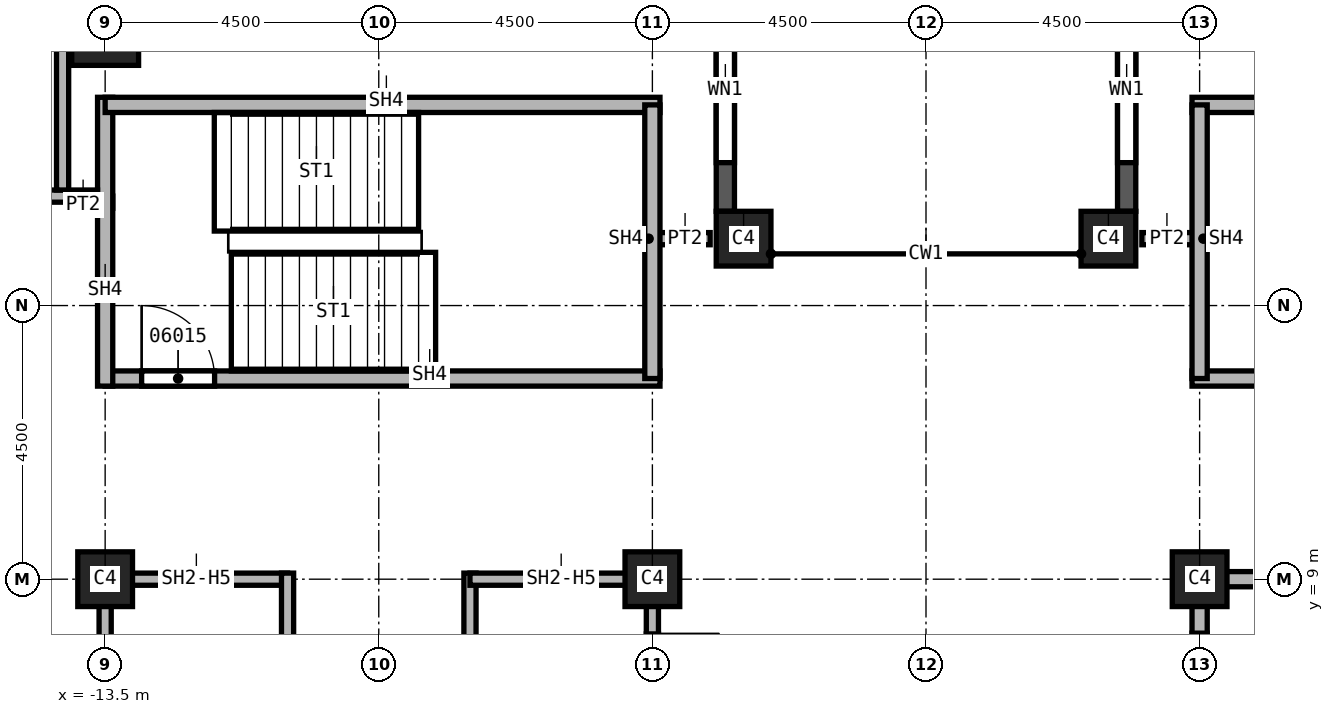
"""IFC4 building model, lengths in metres.
Left out: names, types, materials, properties, quantities, classifications, styles, units other than length and angle.
Written with IfcOpenShell. Run it as: python <this file> out.ifc"""

import sys

from ifc_helpers import new_model, si_unit, direction, frame, frame_2d, origin, origin_2d, place, context, subcontext, project, spatial, rectangle, extrude, element, fill, save


model = new_model("IFC4")
c1 = context("Model", 3, precision=1e-05, world=origin(), true_north=direction((0.0, 1.0)))
c2 = subcontext(c1, "Body", "Model", "MODEL_VIEW")
j1 = project(units=[si_unit("LENGTHUNIT", "METRE"), si_unit("PLANEANGLEUNIT", "RADIAN")], contexts=[c1])
p1 = place(None, origin())
s1 = spatial("IfcSite", under=j1, at=p1, CompositionType="ELEMENT")
p2 = place(p1, origin())
s2 = spatial("IfcBuilding", under=s1, at=p2, CompositionType="ELEMENT")
p3 = place(p2, frame((0.0, 0.0, 130.0)))
s3 = spatial("IfcBuildingStorey", under=s2, at=p3, CompositionType="ELEMENT", Elevation=130.0)
p4 = place(p3, frame((-13.5, 18.0, 0.0), z_axis=(0.0, 0.0, 1.0), x_axis=(1.0, 0.0, 0.0)))
e1 = element("IfcColumn", 1, at=p4, inside=s3, PredefinedType="COLUMN", context=c2, shape_type="SweptSolid", body=[
    extrude(rectangle(XDim=1.1, YDim=1.1, at=origin_2d()), origin(), (0.0, 0.0, 1.0), 3.7),
])
for number, where, z_axis, x_axis in (
    (2, (4.5, 9.0, 0.0), (0.0, 0.0, 1.0), (1.0, 0.0, 0.0)),
    (3, (-4.5, 9.0, 0.0), (0.0, 0.0, 1.0), (1.0, 0.0, 0.0)),
    (4, (-13.5, 9.0, 0.0), (0.0, 0.0, 1.0), (1.0, 0.0, 0.0)),
    (5, (3.0, 14.6, 0.0), (0.0, 0.0, 1.0), (1.0, 0.0, 0.0)),
    (6, (-3.0, 14.6, 0.0), (0.0, 0.0, 1.0), (1.0, 0.0, 0.0)),
):
    element("IfcColumn", number, at=place(p3, frame(where, z_axis=z_axis, x_axis=x_axis)), inside=s3, PredefinedType="COLUMN", context=c2, shape_type="SweptSolid", body=[
        extrude(rectangle(XDim=0.9, YDim=0.9, at=origin_2d()), origin(), (0.0, 0.0, 1.0), 3.7),
    ])
p5 = place(p3, frame((3.3, 23.05, 0.0), z_axis=(0.0, 0.0, 1.0), x_axis=(0.0, -1.0, 0.0)))
e7 = element("IfcWall", 7, at=p5, inside=s3, PredefinedType="SOLIDWALL", context=c2, shape_type="SweptSolid", body=[
    extrude(rectangle(XDim=8.0, YDim=0.3, at=frame_2d((4.0, 0.0))), origin(), (0.0, 0.0, 1.0), 3.1),
])
p6 = place(p5, frame((0.8, 0.0, 0.8)))
e8 = element("IfcOpeningElement", 8, at=p6, cuts=e7, PredefinedType="OPENING", context=c2, shape_type="SweptSolid", body=[
    extrude(rectangle(XDim=2.4, YDim=1.95, at=frame_2d((1.2, 0.975))), frame((0.0, 0.15, 0.0), z_axis=(0.0, -1.0, 0.0), x_axis=(1.0, 0.0, 0.0)), (0.0, 0.0, 1.0), 0.3),
])
p7 = place(p5, frame((4.8, 0.0, 0.8)))
e9 = element("IfcOpeningElement", 9, at=p7, cuts=e7, PredefinedType="OPENING", context=c2, shape_type="SweptSolid", body=[
    extrude(rectangle(XDim=2.4, YDim=1.95, at=frame_2d((1.2, 0.975))), frame((0.0, 0.15, 0.0), z_axis=(0.0, -1.0, 0.0), x_axis=(1.0, 0.0, 0.0)), (0.0, 0.0, 1.0), 0.3),
])
p8 = place(p3, frame((-3.3, 15.05, 0.0), z_axis=(0.0, 0.0, 1.0), x_axis=(0.0, 1.0, 0.0)))
e10 = element("IfcWall", 10, at=p8, inside=s3, PredefinedType="SOLIDWALL", context=c2, shape_type="SweptSolid", body=[
    extrude(rectangle(XDim=8.0, YDim=0.3, at=frame_2d((4.0, 0.0))), origin(), (0.0, 0.0, 1.0), 3.1),
])
p9 = place(p8, frame((0.8, 0.0, 0.8)))
e11 = element("IfcOpeningElement", 11, at=p9, cuts=e10, PredefinedType="OPENING", context=c2, shape_type="SweptSolid", body=[
    extrude(rectangle(XDim=2.4, YDim=1.95, at=frame_2d((1.2, 0.975))), frame((0.0, 0.15, 0.0), z_axis=(0.0, -1.0, 0.0), x_axis=(1.0, 0.0, 0.0)), (0.0, 0.0, 1.0), 0.3),
])
p10 = place(p8, frame((4.8, 0.0, 0.8)))
e12 = element("IfcOpeningElement", 12, at=p10, cuts=e10, PredefinedType="OPENING", context=c2, shape_type="SweptSolid", body=[
    extrude(rectangle(XDim=2.4, YDim=1.95, at=frame_2d((1.2, 0.975))), frame((0.0, 0.15, 0.0), z_axis=(0.0, -1.0, 0.0), x_axis=(1.0, 0.0, 0.0)), (0.0, 0.0, 1.0), 0.3),
])
p11 = place(p3, frame((-14.1, 15.2, 0.0), z_axis=(0.0, 0.0, 1.0), x_axis=(1.0, 0.0, 0.0)))
e13 = element("IfcWall", 13, at=p11, inside=s3, PredefinedType="PARTITIONING", context=c2, shape_type="SweptSolid", body=[
    extrude(rectangle(XDim=0.725, YDim=0.2, at=frame_2d((0.363, 0.0))), origin(), (0.0, 0.0, 1.0), 3.7),
])
for number, where, z_axis, x_axis in (
    (14, (-4.5, 14.6, 0.0), (0.0, 0.0, 1.0), (1.0, 0.0, 0.0)),
    (15, (3.55, 14.6, 0.0), (0.0, 0.0, 1.0), (1.0, 0.0, 0.0)),
):
    element("IfcWall", number, at=place(p3, frame(where, z_axis=z_axis, x_axis=x_axis)), inside=s3, PredefinedType="PARTITIONING", context=c2, shape_type="SweptSolid", body=[
        extrude(rectangle(XDim=0.95, YDim=0.2, at=frame_2d((0.475, 0.0))), origin(), (0.0, 0.0, 1.0), 3.7),
    ])
p12 = place(p3, frame((-13.5, 5.0, 0.0), z_axis=(0.0, 0.0, 1.0), x_axis=(0.0, 1.0, 0.0)))
e16 = element("IfcWall", 16, at=p12, inside=s3, PredefinedType="SOLIDWALL", context=c2, shape_type="SweptSolid", body=[
    extrude(rectangle(XDim=4.1, YDim=0.2, at=frame_2d((2.05, 0.0))), origin(), (0.0, 0.0, 1.0), 2.938),
])
p13 = place(p3, frame((-13.5, 9.0, 0.0), z_axis=(0.0, 0.0, 1.0), x_axis=(1.0, 0.0, 0.0)))
e17 = element("IfcWall", 17, at=p13, inside=s3, PredefinedType="SOLIDWALL", context=c2, shape_type="SweptSolid", body=[
    extrude(rectangle(XDim=3.0, YDim=0.2, at=frame_2d((1.5, 0.0))), origin(), (0.0, 0.0, 1.0), 2.938),
])
p14 = place(p3, frame((-10.5, 4.925, 0.0), z_axis=(0.0, 0.0, 1.0), x_axis=(0.0, 1.0, 0.0)))
e18 = element("IfcWall", 18, at=p14, inside=s3, PredefinedType="SOLIDWALL", context=c2, shape_type="SweptSolid", body=[
    extrude(rectangle(XDim=4.175, YDim=0.2, at=frame_2d((2.087, 0.0))), origin(), (0.0, 0.0, 1.0), 3.7),
])
p15 = place(p14, frame((0.25, 0.0, 0.0)))
e19 = element("IfcOpeningElement", 19, at=p15, cuts=e18, PredefinedType="OPENING", context=c2, shape_type="SweptSolid", body=[
    extrude(rectangle(XDim=1.1, YDim=2.1, at=frame_2d((0.55, 1.05))), frame((0.0, 0.1, 0.0), z_axis=(0.0, -1.0, 0.0), x_axis=(1.0, 0.0, 0.0)), (0.0, 0.0, 1.0), 0.2),
])
p16 = place(p3, frame((-7.5, 2.875, 0.0), z_axis=(0.0, 0.0, 1.0), x_axis=(0.0, 1.0, 0.0)))
e20 = element("IfcWall", 20, at=p16, inside=s3, PredefinedType="SOLIDWALL", context=c2, shape_type="SweptSolid", body=[
    extrude(rectangle(XDim=6.225, YDim=0.2, at=frame_2d((3.113, 0.0))), origin(), (0.0, 0.0, 1.0), 3.7),
])
p17 = place(p3, frame((-7.5, 9.0, 0.0), z_axis=(0.0, 0.0, 1.0), x_axis=(1.0, 0.0, 0.0)))
e21 = element("IfcWall", 21, at=p17, inside=s3, PredefinedType="SOLIDWALL", context=c2, shape_type="SweptSolid", body=[
    extrude(rectangle(XDim=3.0, YDim=0.2, at=frame_2d((1.5, 0.0))), origin(), (0.0, 0.0, 1.0), 2.938),
])
p18 = place(p3, frame((-4.5, 9.1, 0.0), z_axis=(0.0, 0.0, 1.0), x_axis=(0.0, -1.0, 0.0)))
e22 = element("IfcWall", 22, at=p18, inside=s3, PredefinedType="SOLIDWALL", context=c2, shape_type="SweptSolid", body=[
    extrude(rectangle(XDim=9.1, YDim=0.2, at=frame_2d((4.55, 0.0))), origin(), (0.0, 0.0, 1.0), 2.938),
])
p19 = place(p18, frame((6.5, 0.0, 0.0)))
e23 = element("IfcOpeningElement", 23, at=p19, cuts=e22, PredefinedType="OPENING", context=c2, shape_type="SweptSolid", body=[
    extrude(rectangle(XDim=1.1, YDim=2.1, at=frame_2d((0.55, 1.05))), frame((0.0, 0.1, 0.0), z_axis=(0.0, -1.0, 0.0), x_axis=(1.0, 0.0, 0.0)), (0.0, 0.0, 1.0), 0.2),
])
p20 = place(p18, frame((1.0, 0.0, 0.0)))
e24 = element("IfcOpeningElement", 24, at=p20, cuts=e22, PredefinedType="OPENING", context=c2, shape_type="SweptSolid", body=[
    extrude(rectangle(XDim=1.1, YDim=2.1, at=frame_2d((0.55, 1.05))), frame((0.0, 0.1, 0.0), z_axis=(0.0, -1.0, 0.0), x_axis=(1.0, 0.0, 0.0)), (0.0, 0.0, 1.0), 0.2),
])
p21 = place(p3, frame((4.5, 0.0, 0.0), z_axis=(0.0, 0.0, 1.0), x_axis=(0.0, 1.0, 0.0)))
e25 = element("IfcWall", 25, at=p21, inside=s3, PredefinedType="SOLIDWALL", context=c2, shape_type="SweptSolid", body=[
    extrude(rectangle(XDim=9.125, YDim=0.25, at=frame_2d((4.562, 0.0))), origin(), (0.0, 0.0, 1.0), 2.938),
])
p22 = place(p21, frame((0.95, 0.0, 0.0)))
e26 = element("IfcOpeningElement", 26, at=p22, cuts=e25, PredefinedType="OPENING", context=c2, shape_type="SweptSolid", body=[
    extrude(rectangle(XDim=1.1, YDim=2.1, at=frame_2d((0.55, 1.05))), frame((0.0, 0.125, 0.0), z_axis=(0.0, -1.0, 0.0), x_axis=(1.0, 0.0, 0.0)), (0.0, 0.0, 1.0), 0.25),
])
p23 = place(p21, frame((3.95, 0.0, 0.0)))
e27 = element("IfcOpeningElement", 27, at=p23, cuts=e25, PredefinedType="OPENING", context=c2, shape_type="SweptSolid", body=[
    extrude(rectangle(XDim=1.1, YDim=2.1, at=frame_2d((0.55, 1.05))), frame((0.0, 0.125, 0.0), z_axis=(0.0, -1.0, 0.0), x_axis=(1.0, 0.0, 0.0)), (0.0, 0.0, 1.0), 0.25),
])
p24 = place(p21, frame((7.012, 0.0, 0.0)))
e28 = element("IfcOpeningElement", 28, at=p24, cuts=e25, PredefinedType="OPENING", context=c2, shape_type="SweptSolid", body=[
    extrude(rectangle(XDim=1.1, YDim=2.1, at=frame_2d((0.55, 1.05))), frame((0.0, 0.125, 0.0), z_axis=(0.0, -1.0, 0.0), x_axis=(1.0, 0.0, 0.0)), (0.0, 0.0, 1.0), 0.25),
])
p25 = place(p3, frame((4.5, 9.0, 0.0), z_axis=(0.0, 0.0, 1.0), x_axis=(1.0, 0.0, 0.0)))
e29 = element("IfcWall", 29, at=p25, inside=s3, PredefinedType="SOLIDWALL", context=c2, shape_type="SweptSolid", body=[
    extrude(rectangle(XDim=3.0, YDim=0.25, at=frame_2d((1.5, 0.0))), origin(), (0.0, 0.0, 1.0), 2.938),
])
p26 = place(p3, frame((-13.5, 12.3, 0.0), z_axis=(0.0, 0.0, 1.0), x_axis=(1.0, 0.0, 0.0)))
e30 = element("IfcWall", 30, at=p26, inside=s3, PredefinedType="SOLIDWALL", context=c2, shape_type="SweptSolid", body=[
    extrude(rectangle(XDim=9.125, YDim=0.25, at=frame_2d((4.562, 0.0))), origin(), (0.0, 0.0, 1.0), 3.7),
])
p27 = place(p26, frame((0.6, 0.0, 0.0)))
e31 = element("IfcOpeningElement", 31, at=p27, cuts=e30, PredefinedType="OPENING", context=c2, shape_type="SweptSolid", body=[
    extrude(rectangle(XDim=1.2, YDim=2.1, at=frame_2d((0.6, 1.05))), frame((0.0, 0.125, 0.0), z_axis=(0.0, -1.0, 0.0), x_axis=(1.0, 0.0, 0.0)), (0.0, 0.0, 1.0), 0.25),
])
p28 = place(p3, frame((-13.5, 12.175, 0.0), z_axis=(0.0, 0.0, 1.0), x_axis=(0.0, 1.0, 0.0)))
e32 = element("IfcWall", 32, at=p28, inside=s3, PredefinedType="SOLIDWALL", context=c2, shape_type="SweptSolid", body=[
    extrude(rectangle(XDim=4.75, YDim=0.25, at=frame_2d((2.375, 0.0))), origin(), (0.0, 0.0, 1.0), 3.7),
])
p29 = place(p3, frame((-13.5, 16.8, 0.0), z_axis=(0.0, 0.0, 1.0), x_axis=(1.0, 0.0, 0.0)))
e33 = element("IfcWall", 33, at=p29, inside=s3, PredefinedType="SOLIDWALL", context=c2, shape_type="SweptSolid", body=[
    extrude(rectangle(XDim=9.125, YDim=0.25, at=frame_2d((4.562, 0.0))), origin(), (0.0, 0.0, 1.0), 3.7),
])
p30 = place(p3, frame((-4.5, 16.8, 0.0), z_axis=(0.0, 0.0, 1.0), x_axis=(0.0, -1.0, 0.0)))
e34 = element("IfcWall", 34, at=p30, inside=s3, PredefinedType="SOLIDWALL", context=c2, shape_type="SweptSolid", body=[
    extrude(rectangle(XDim=4.5, YDim=0.25, at=frame_2d((2.25, 0.0))), origin(), (0.0, 0.0, 1.0), 3.7),
])
p31 = place(p3, frame((4.375, 12.3, 0.0), z_axis=(0.0, 0.0, 1.0), x_axis=(1.0, 0.0, 0.0)))
e35 = element("IfcWall", 35, at=p31, inside=s3, PredefinedType="SOLIDWALL", context=c2, shape_type="SweptSolid", body=[
    extrude(rectangle(XDim=9.125, YDim=0.25, at=frame_2d((4.562, 0.0))), origin(), (0.0, 0.0, 1.0), 3.7),
])
p32 = place(p31, frame((7.2, 0.0, 0.0)))
e36 = element("IfcOpeningElement", 36, at=p32, cuts=e35, PredefinedType="OPENING", context=c2, shape_type="SweptSolid", body=[
    extrude(rectangle(XDim=1.2, YDim=2.1, at=frame_2d((0.6, 1.05))), frame((0.0, 0.125, 0.0), z_axis=(0.0, -1.0, 0.0), x_axis=(1.0, 0.0, 0.0)), (0.0, 0.0, 1.0), 0.25),
])
p33 = place(p3, frame((4.375, 16.8, 0.0), z_axis=(0.0, 0.0, 1.0), x_axis=(1.0, 0.0, 0.0)))
e37 = element("IfcWall", 37, at=p33, inside=s3, PredefinedType="SOLIDWALL", context=c2, shape_type="SweptSolid", body=[
    extrude(rectangle(XDim=9.125, YDim=0.25, at=frame_2d((4.562, 0.0))), origin(), (0.0, 0.0, 1.0), 3.7),
])
p34 = place(p3, frame((4.5, 12.3, 0.0), z_axis=(0.0, 0.0, 1.0), x_axis=(0.0, 1.0, 0.0)))
e38 = element("IfcWall", 38, at=p34, inside=s3, PredefinedType="SOLIDWALL", context=c2, shape_type="SweptSolid", body=[
    extrude(rectangle(XDim=4.5, YDim=0.25, at=frame_2d((2.25, 0.0))), origin(), (0.0, 0.0, 1.0), 3.7),
])
p35 = place(p3, frame((-21.9, 15.3, 0.0), z_axis=(0.0, 0.0, 1.0), x_axis=(1.0, 0.0, 0.0)))
e39 = element("IfcWall", 39, at=p35, inside=s3, PredefinedType="SOLIDWALL", context=c2, shape_type="SweptSolid", body=[
    extrude(rectangle(XDim=8.275, YDim=0.2, at=frame_2d((4.137, 0.0))), origin(), (0.0, 0.0, 1.0), 3.7),
])
p36 = place(p35, frame((4.8, 0.0, 0.0)))
e40 = element("IfcOpeningElement", 40, at=p36, cuts=e39, PredefinedType="OPENING", context=c2, shape_type="SweptSolid", body=[
    extrude(rectangle(XDim=1.2, YDim=2.1, at=frame_2d((0.6, 1.05))), frame((0.0, 0.1, 0.0), z_axis=(0.0, -1.0, 0.0), x_axis=(1.0, 0.0, 0.0)), (0.0, 0.0, 1.0), 0.2),
])
p37 = place(p3, frame((-14.2, 15.4, 0.0), z_axis=(0.0, 0.0, 1.0), x_axis=(0.0, 1.0, 0.0)))
e41 = element("IfcWall", 41, at=p37, inside=s3, PredefinedType="SOLIDWALL", context=c2, shape_type="SweptSolid", body=[
    extrude(rectangle(XDim=5.9, YDim=0.2, at=frame_2d((2.95, 0.0))), origin(), (0.0, 0.0, 1.0), 3.7),
])
p38 = place(p7, origin())
e42 = element("IfcWindow", 42, at=p38, inside=s3, PartitioningType="SINGLE_PANEL", PredefinedType="WINDOW", context=c2, shape_type="SweptSolid", body=[
    extrude(rectangle(XDim=2.4, YDim=1.95, at=frame_2d((1.2, 0.975))), frame((0.0, 0.03, 0.0), z_axis=(0.0, -1.0, 0.0), x_axis=(1.0, 0.0, 0.0)), (0.0, 0.0, 1.0), 0.06),
])
fill(e9, e42)
p39 = place(p9, origin())
e43 = element("IfcWindow", 43, at=p39, inside=s3, PartitioningType="SINGLE_PANEL", PredefinedType="WINDOW", context=c2, shape_type="SweptSolid", body=[
    extrude(rectangle(XDim=2.4, YDim=1.95, at=frame_2d((1.2, 0.975))), frame((0.0, 0.03, 0.0), z_axis=(0.0, -1.0, 0.0), x_axis=(1.0, 0.0, 0.0)), (0.0, 0.0, 1.0), 0.06),
])
fill(e11, e43)
p40 = place(p27, origin())
e44 = element("IfcDoor", 44, at=p40, inside=s3, OperationType="SINGLE_SWING_RIGHT", PredefinedType="DOOR", context=c2, shape_type="SweptSolid", body=[
    extrude(rectangle(XDim=1.2, YDim=2.1, at=frame_2d((0.6, 1.05))), frame((0.0, 0.025, 0.0), z_axis=(0.0, -1.0, 0.0), x_axis=(1.0, 0.0, 0.0)), (0.0, 0.0, 1.0), 0.05),
])
fill(e31, e44)
p41 = place(p24, origin())
e45 = element("IfcDoor", 45, at=p41, inside=s3, OperationType="SLIDING_TO_LEFT", PredefinedType="DOOR", context=c2, shape_type="SweptSolid", body=[
    extrude(rectangle(XDim=1.1, YDim=2.1, at=frame_2d((0.55, 1.05))), frame((0.0, 0.025, 0.0), z_axis=(0.0, -1.0, 0.0), x_axis=(1.0, 0.0, 0.0)), (0.0, 0.0, 1.0), 0.05),
])
fill(e28, e45)
save(model, sys.argv[1])
